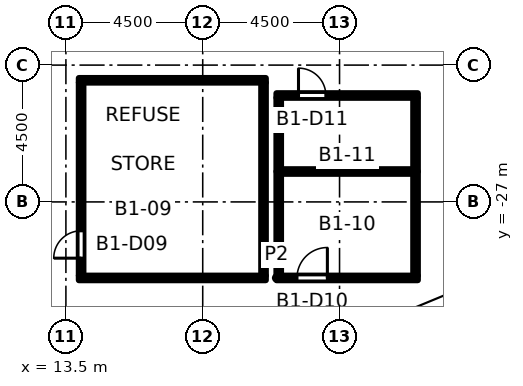
"""IFC4 building model, lengths in metres.
Left out: names, types, materials, properties, quantities, classifications, styles, units other than length and angle.
Written with IfcOpenShell. Run it as: python <this file> out.ifc"""

import sys

from ifc_helpers import new_model, si_unit, direction, frame, frame_2d, origin, place, context, subcontext, project, spatial, rectangle, extrude, element, fill, save


model = new_model("IFC4")
c1 = context("Model", 3, precision=1e-05, world=origin(), true_north=direction((0.0, 1.0)))
c2 = subcontext(c1, "Body", "Model", "MODEL_VIEW")
j1 = project(units=[si_unit("LENGTHUNIT", "METRE"), si_unit("PLANEANGLEUNIT", "RADIAN")], contexts=[c1])
p1 = place(None, origin())
s1 = spatial("IfcSite", under=j1, at=p1, CompositionType="ELEMENT")
p2 = place(p1, origin())
s2 = spatial("IfcBuilding", under=s1, at=p2, CompositionType="ELEMENT")
p3 = place(p2, frame((0.0, 0.0, -5.0)))
s3 = spatial("IfcBuildingStorey", under=s2, at=p3, CompositionType="ELEMENT", Elevation=-5.0)
p4 = place(p3, frame((22.735, -32.431, -0.25), z_axis=(0.0, 0.0, 1.0), x_axis=(0.923879388078, 0.382683781057, 0.0)))
e1 = element("IfcWall", 1, at=p4, inside=s3, PredefinedType="SOLIDWALL", context=c2, shape_type="SweptSolid", body=[
    extrude(rectangle(XDim=7.318, YDim=0.5, at=frame_2d((3.659, 0.0))), origin(), (0.0, 0.0, 1.0), 5.1),
])
p5 = place(p3, frame((20.425, -29.5, 0.0), z_axis=(0.0, 0.0, 1.0), x_axis=(1.0, 0.0, 0.0)))
e2 = element("IfcWall", 2, at=p5, inside=s3, PredefinedType="PARTITIONING", context=c2, shape_type="SweptSolid", body=[
    extrude(rectangle(XDim=4.65, YDim=0.15, at=frame_2d((2.325, 0.0))), origin(), (0.0, 0.0, 1.0), 4.55),
])
p6 = place(p5, frame((0.675, 0.0, 0.0)))
e3 = element("IfcOpeningElement", 3, at=p6, cuts=e2, PredefinedType="OPENING", context=c2, shape_type="SweptSolid", body=[
    extrude(rectangle(XDim=1.0, YDim=2.1, at=frame_2d((0.5, 1.05))), frame((0.0, 0.085, 0.0), z_axis=(0.0, -1.0, 0.0), x_axis=(1.0, 0.0, 0.0)), (0.0, 0.0, 1.0), 0.17),
])
p7 = place(p3, frame((13.925, -29.5, 0.0), z_axis=(0.0, 0.0, 1.0), x_axis=(1.0, 0.0, 0.0)))
e4 = element("IfcWall", 4, at=p7, inside=s3, PredefinedType="PARTITIONING", context=c2, shape_type="SweptSolid", body=[
    extrude(rectangle(XDim=6.15, YDim=0.15, at=frame_2d((3.075, 0.0))), origin(), (0.0, 0.0, 1.0), 4.55),
])
p8 = place(p3, frame((20.575, -26.0, 0.0), z_axis=(0.0, 0.0, 1.0), x_axis=(1.0, 0.0, 0.0)))
e5 = element("IfcWall", 5, at=p8, inside=s3, PredefinedType="PARTITIONING", context=c2, shape_type="SweptSolid", body=[
    extrude(rectangle(XDim=4.35, YDim=0.15, at=frame_2d((2.175, 0.0))), origin(), (0.0, 0.0, 1.0), 4.55),
])
p9 = place(p3, frame((20.425, -23.5, 0.0), z_axis=(0.0, 0.0, 1.0), x_axis=(1.0, 0.0, 0.0)))
e6 = element("IfcWall", 6, at=p9, inside=s3, PredefinedType="PARTITIONING", context=c2, shape_type="SweptSolid", body=[
    extrude(rectangle(XDim=4.65, YDim=0.15, at=frame_2d((2.325, 0.0))), origin(), (0.0, 0.0, 1.0), 4.55),
])
p10 = place(p9, frame((0.725, 0.0, 0.0)))
e7 = element("IfcOpeningElement", 7, at=p10, cuts=e6, PredefinedType="OPENING", context=c2, shape_type="SweptSolid", body=[
    extrude(rectangle(XDim=0.9, YDim=2.1, at=frame_2d((0.45, 1.05))), frame((0.0, 0.085, 0.0), z_axis=(0.0, -1.0, 0.0), x_axis=(1.0, 0.0, 0.0)), (0.0, 0.0, 1.0), 0.17),
])
p11 = place(p3, frame((13.925, -23.0, 0.0), z_axis=(0.0, 0.0, 1.0), x_axis=(1.0, 0.0, 0.0)))
e8 = element("IfcWall", 8, at=p11, inside=s3, PredefinedType="PARTITIONING", context=c2, shape_type="SweptSolid", body=[
    extrude(rectangle(XDim=6.15, YDim=0.15, at=frame_2d((3.075, 0.0))), origin(), (0.0, 0.0, 1.0), 4.55),
])
p12 = place(p3, frame((14.0, -29.425, 0.0), z_axis=(0.0, 0.0, 1.0), x_axis=(0.0, 1.0, 0.0)))
e9 = element("IfcWall", 9, at=p12, inside=s3, PredefinedType="PARTITIONING", context=c2, shape_type="SweptSolid", body=[
    extrude(rectangle(XDim=6.35, YDim=0.15, at=frame_2d((3.175, 0.0))), origin(), (0.0, 0.0, 1.0), 4.55),
])
p13 = place(p12, frame((0.575, 0.0, 0.0)))
e10 = element("IfcOpeningElement", 10, at=p13, cuts=e9, PredefinedType="OPENING", context=c2, shape_type="SweptSolid", body=[
    extrude(rectangle(XDim=0.9, YDim=2.1, at=frame_2d((0.45, 1.05))), frame((0.0, 0.085, 0.0), z_axis=(0.0, -1.0, 0.0), x_axis=(1.0, 0.0, 0.0)), (0.0, 0.0, 1.0), 0.17),
])
p14 = place(p3, frame((20.0, -29.425, 0.0), z_axis=(0.0, 0.0, 1.0), x_axis=(0.0, 1.0, 0.0)))
e11 = element("IfcWall", 11, at=p14, inside=s3, PredefinedType="PARTITIONING", context=c2, shape_type="SweptSolid", body=[
    extrude(rectangle(XDim=6.35, YDim=0.15, at=frame_2d((3.175, 0.0))), origin(), (0.0, 0.0, 1.0), 4.55),
])
p15 = place(p3, frame((20.5, -29.425, 0.0), z_axis=(0.0, 0.0, 1.0), x_axis=(0.0, 1.0, 0.0)))
e12 = element("IfcWall", 12, at=p15, inside=s3, PredefinedType="PARTITIONING", context=c2, shape_type="SweptSolid", body=[
    extrude(rectangle(XDim=3.425, YDim=0.15, at=frame_2d((1.712, 0.0))), origin(), (0.0, 0.0, 1.0), 4.55),
])
p16 = place(p3, frame((20.5, -26.0, 0.0), z_axis=(0.0, 0.0, 1.0), x_axis=(0.0, 1.0, 0.0)))
e13 = element("IfcWall", 13, at=p16, inside=s3, PredefinedType="PARTITIONING", context=c2, shape_type="SweptSolid", body=[
    extrude(rectangle(XDim=2.425, YDim=0.15, at=frame_2d((1.212, 0.0))), origin(), (0.0, 0.0, 1.0), 4.55),
])
p17 = place(p3, frame((25.0, -29.425, 0.0), z_axis=(0.0, 0.0, 1.0), x_axis=(0.0, 1.0, 0.0)))
e14 = element("IfcWall", 14, at=p17, inside=s3, PredefinedType="PARTITIONING", context=c2, shape_type="SweptSolid", body=[
    extrude(rectangle(XDim=3.425, YDim=0.15, at=frame_2d((1.712, 0.0))), origin(), (0.0, 0.0, 1.0), 4.55),
])
p18 = place(p3, frame((25.0, -26.0, 0.0), z_axis=(0.0, 0.0, 1.0), x_axis=(0.0, 1.0, 0.0)))
e15 = element("IfcWall", 15, at=p18, inside=s3, PredefinedType="PARTITIONING", context=c2, shape_type="SweptSolid", body=[
    extrude(rectangle(XDim=2.425, YDim=0.15, at=frame_2d((1.212, 0.0))), origin(), (0.0, 0.0, 1.0), 4.55),
])
p19 = place(p13, origin())
e16 = element("IfcDoor", 16, at=p19, inside=s3, OperationType="SINGLE_SWING_LEFT", PredefinedType="DOOR", context=c2, shape_type="SweptSolid", body=[
    extrude(rectangle(XDim=0.9, YDim=2.1, at=frame_2d((0.45, 1.05))), frame((0.0, 0.025, 0.0), z_axis=(0.0, -1.0, 0.0), x_axis=(1.0, 0.0, 0.0)), (0.0, 0.0, 1.0), 0.05),
])
fill(e10, e16)
p20 = place(p6, origin())
e17 = element("IfcDoor", 17, at=p20, inside=s3, OperationType="SINGLE_SWING_RIGHT", PredefinedType="DOOR", context=c2, shape_type="SweptSolid", body=[
    extrude(rectangle(XDim=1.0, YDim=2.1, at=frame_2d((0.5, 1.05))), frame((0.0, 0.025, 0.0), z_axis=(0.0, -1.0, 0.0), x_axis=(1.0, 0.0, 0.0)), (0.0, 0.0, 1.0), 0.05),
])
fill(e3, e17)
p21 = place(p10, origin())
e18 = element("IfcDoor", 18, at=p21, inside=s3, OperationType="SINGLE_SWING_LEFT", PredefinedType="DOOR", context=c2, shape_type="SweptSolid", body=[
    extrude(rectangle(XDim=0.9, YDim=2.1, at=frame_2d((0.45, 1.05))), frame((0.0, 0.025, 0.0), z_axis=(0.0, -1.0, 0.0), x_axis=(1.0, 0.0, 0.0)), (0.0, 0.0, 1.0), 0.05),
])
fill(e7, e18)
save(model, sys.argv[1])
